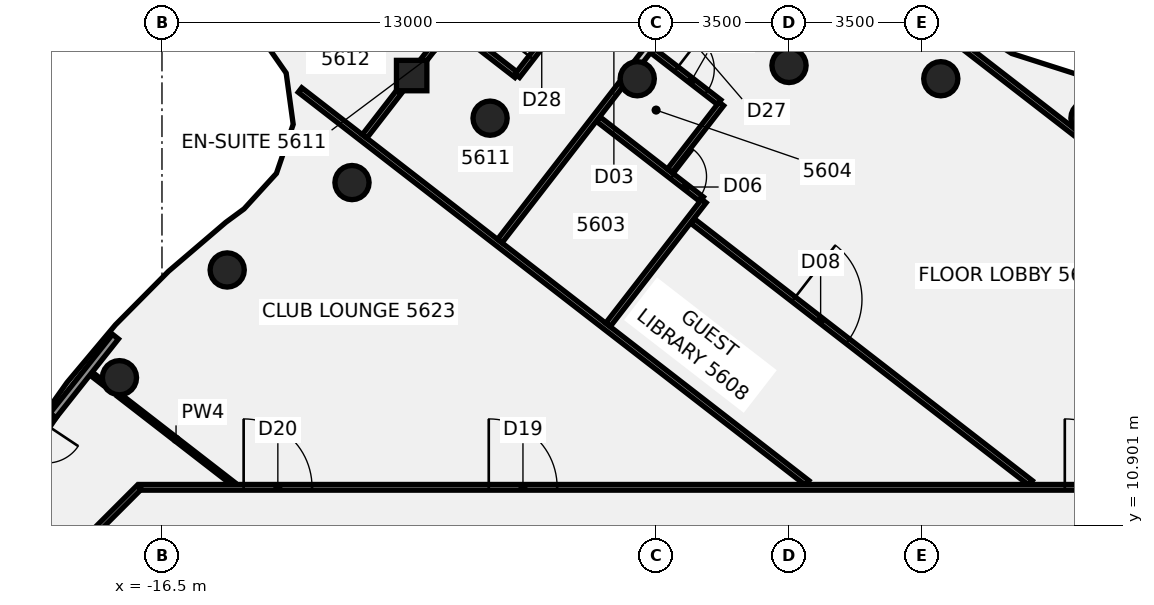
"""IFC4 building model, lengths in metres.
Left out: names, types, materials, properties, quantities, classifications, styles, units other than length and angle.
Written with IfcOpenShell. Run it as: python <this file> out.ifc"""

import sys

from ifc_helpers import new_model, si_unit, direction, frame, frame_2d, origin, origin_2d, place, context, subcontext, project, spatial, rectangle, circle, extrude, element, fill, save


model = new_model("IFC4")
c1 = context("Model", 3, precision=1e-05, world=origin(), true_north=direction((0.0, 1.0)))
c2 = subcontext(c1, "Body", "Model", "MODEL_VIEW")
j1 = project(units=[si_unit("LENGTHUNIT", "METRE"), si_unit("PLANEANGLEUNIT", "RADIAN")], contexts=[c1])
p1 = place(None, origin())
s1 = spatial("IfcSite", under=j1, at=p1, CompositionType="ELEMENT")
p2 = place(p1, origin())
s2 = spatial("IfcBuilding", under=s1, at=p2, CompositionType="ELEMENT")
p3 = place(p2, frame((0.0, 0.0, 223.5)))
s3 = spatial("IfcBuildingStorey", under=s2, at=p3, CompositionType="ELEMENT", Elevation=223.5)
for number, where, z_axis, x_axis in (
    (1, (7.866, 21.613, -0.14), (0.0, 0.0, 1.0), (1.0, 0.0, 0.0)),
    (2, (3.994, 22.651, -0.14), (0.0, 0.0, 1.0), (1.0, 0.0, 0.0)),
    (3, (0.0, 23.0, -0.14), (0.0, 0.0, 1.0), (1.0, 0.0, 0.0)),
    (4, (-3.994, 22.651, -0.14), (0.0, 0.0, 1.0), (1.0, 0.0, 0.0)),
    (5, (-7.866, 21.613, -0.14), (0.0, 0.0, 1.0), (1.0, 0.0, 0.0)),
    (6, (-11.5, 19.919, -0.14), (0.0, 0.0, 1.0), (1.0, 0.0, 0.0)),
    (7, (-14.784, 17.619, -0.14), (0.0, 0.0, 1.0), (1.0, 0.0, 0.0)),
    (8, (-17.619, 14.784, -0.14), (0.0, 0.0, 1.0), (1.0, 0.0, 0.0)),
):
    element("IfcColumn", number, at=place(p3, frame(where, z_axis=z_axis, x_axis=x_axis)), inside=s3, PredefinedType="COLUMN", context=c2, shape_type="SweptSolid", body=[
        extrude(circle(Radius=0.45, at=origin_2d()), origin(), (0.0, 0.0, 1.0), 3.6),
    ])
p4 = place(p3, frame((-9.93, 22.734, -0.139), z_axis=(-0.003253410494, -0.050292303889, 0.998729242332), x_axis=(0.612206971223, 0.789594273186, 0.041755336635)))
e9 = element("IfcColumn", 9, at=p4, inside=s3, PredefinedType="COLUMN", context=c2, shape_type="SweptSolid", body=[
    extrude(rectangle(XDim=0.8, YDim=0.8, at=origin_2d()), origin(), (0.0, 0.0, 1.0), 3.602),
])
p5 = place(p3, frame((-18.391, 14.913, 0.0), z_axis=(0.0, 0.0, 1.0), x_axis=(0.79050846248, -0.612451117026, 0.0)))
e10 = element("IfcWall", 10, at=p5, inside=s3, PredefinedType="PARTITIONING", context=c2, shape_type="SweptSolid", body=[
    extrude(rectangle(XDim=0.443, YDim=0.1, at=frame_2d((0.221, 0.0))), origin(), (0.0, 0.0, 1.0), 2.864),
])
p6 = place(p3, frame((-17.636, 14.329, 0.0), z_axis=(0.0, 0.0, 1.0), x_axis=(0.790578641308, -0.612360524452, 0.0)))
e11 = element("IfcWall", 11, at=p6, inside=s3, PredefinedType="PARTITIONING", context=c2, shape_type="SweptSolid", body=[
    extrude(rectangle(XDim=3.811, YDim=0.1, at=frame_2d((1.906, 0.0))), origin(), (0.0, 0.0, 1.0), 2.864),
])
p7 = place(p3, frame((-12.868, 22.354, 0.0), z_axis=(0.0, 0.0, 1.0), x_axis=(0.790589551305, -0.61234643901, 0.0)))
e12 = element("IfcWall", 12, at=p7, inside=s3, PredefinedType="PARTITIONING", context=c2, shape_type="SweptSolid", body=[
    extrude(rectangle(XDim=16.882, YDim=0.15, at=frame_2d((8.441, 0.0))), origin(), (0.0, 0.0, 1.0), 2.864),
])
p8 = place(p3, frame((-10.612, 25.414, 0.0), z_axis=(0.0, 0.0, 1.0), x_axis=(0.790364214812, -0.612637256412, 0.0)))
e13 = element("IfcWall", 13, at=p8, inside=s3, PredefinedType="PARTITIONING", context=c2, shape_type="SweptSolid", body=[
    extrude(rectangle(XDim=4.36, YDim=0.15, at=frame_2d((2.18, 0.0))), origin(), (0.0, 0.0, 1.0), 2.864),
])
p9 = place(p3, frame((-5.023, 21.59, 0.0), z_axis=(0.0, 0.0, 1.0), x_axis=(0.790487958192, -0.612477581592, 0.0)))
e14 = element("IfcWall", 14, at=p9, inside=s3, PredefinedType="PARTITIONING", context=c2, shape_type="SweptSolid", body=[
    extrude(rectangle(XDim=3.445, YDim=0.15, at=frame_2d((1.723, 0.0))), origin(), (0.0, 0.0, 1.0), 2.864),
])
p10 = place(p9, frame((2.47, 0.0, 0.0)))
e15 = element("IfcOpeningElement", 15, at=p10, cuts=e14, PredefinedType="OPENING", context=c2, shape_type="SweptSolid", body=[
    extrude(rectangle(XDim=0.9, YDim=2.1, at=frame_2d((0.45, 1.05))), frame((0.0, 0.085, 0.0), z_axis=(0.0, -1.0, 0.0), x_axis=(1.0, 0.0, 0.0)), (0.0, 0.0, 1.0), 0.17),
])
p11 = place(p3, frame((-3.583, 23.384, 0.0), z_axis=(0.0, 0.0, 1.0), x_axis=(0.790792860223, -0.612083860447, 0.0)))
e16 = element("IfcWall", 16, at=p11, inside=s3, PredefinedType="PARTITIONING", context=c2, shape_type="SweptSolid", body=[
    extrude(rectangle(XDim=2.205, YDim=0.15, at=frame_2d((1.103, 0.0))), origin(), (0.0, 0.0, 1.0), 2.864),
])
p12 = place(p11, frame((0.78, 0.0, 0.0)))
e17 = element("IfcOpeningElement", 17, at=p12, cuts=e16, PredefinedType="OPENING", context=c2, shape_type="SweptSolid", body=[
    extrude(rectangle(XDim=1.0, YDim=2.1, at=frame_2d((0.5, 1.05))), frame((0.0, 0.085, 0.0), z_axis=(0.0, -1.0, 0.0), x_axis=(1.0, 0.0, 0.0)), (0.0, 0.0, 1.0), 0.17),
])
p13 = place(p3, frame((-2.544, 18.911, 0.0), z_axis=(0.0, 0.0, 1.0), x_axis=(0.790555726882, -0.612390106626, 0.0)))
e18 = element("IfcWall", 18, at=p13, inside=s3, PredefinedType="PARTITIONING", context=c2, shape_type="SweptSolid", body=[
    extrude(rectangle(XDim=11.258, YDim=0.15, at=frame_2d((5.629, 0.0))), origin(), (0.0, 0.0, 1.0), 2.864),
])
p14 = place(p13, frame((3.37, 0.0, 0.0)))
e19 = element("IfcOpeningElement", 19, at=p14, cuts=e18, PredefinedType="OPENING", context=c2, shape_type="SweptSolid", body=[
    extrude(rectangle(XDim=1.8, YDim=2.1, at=frame_2d((0.9, 1.05))), frame((0.0, 0.085, 0.0), z_axis=(0.0, -1.0, 0.0), x_axis=(1.0, 0.0, 0.0)), (0.0, 0.0, 1.0), 0.17),
])
p15 = place(p3, frame((2.355, 25.236, 0.0), z_axis=(0.0, 0.0, 1.0), x_axis=(0.790554792129, -0.612391313329, 0.0)))
e20 = element("IfcWall", 20, at=p15, inside=s3, PredefinedType="PARTITIONING", context=c2, shape_type="SweptSolid", body=[
    extrude(rectangle(XDim=14.04, YDim=0.15, at=frame_2d((7.02, 0.0))), origin(), (0.0, 0.0, 1.0), 2.864),
])
p16 = place(p15, frame((7.87, 0.0, 0.0)))
e21 = element("IfcOpeningElement", 21, at=p16, cuts=e20, PredefinedType="OPENING", context=c2, shape_type="SweptSolid", body=[
    extrude(rectangle(XDim=1.8, YDim=2.1, at=frame_2d((0.9, 1.05))), frame((0.0, 0.085, 0.0), z_axis=(0.0, -1.0, 0.0), x_axis=(1.0, 0.0, 0.0)), (0.0, 0.0, 1.0), 0.17),
])
p17 = place(p3, frame((-17.065, 11.9, 0.0), z_axis=(0.0, 0.0, 1.0), x_axis=(1.0, 0.0, 0.0)))
e22 = element("IfcWall", 22, at=p17, inside=s3, PredefinedType="PARTITIONING", context=c2, shape_type="SweptSolid", body=[
    extrude(rectangle(XDim=34.165, YDim=0.15, at=frame_2d((17.083, 0.0))), origin(), (0.0, 0.0, 1.0), 2.864),
])
p18 = place(p17, frame((24.322, 0.0, 0.0)))
e23 = element("IfcOpeningElement", 23, at=p18, cuts=e22, PredefinedType="OPENING", context=c2, shape_type="SweptSolid", body=[
    extrude(rectangle(XDim=1.8, YDim=2.1, at=frame_2d((0.9, 1.05))), frame((0.0, 0.085, 0.0), z_axis=(0.0, -1.0, 0.0), x_axis=(1.0, 0.0, 0.0)), (0.0, 0.0, 1.0), 0.17),
])
p19 = place(p17, frame((9.164, 0.0, 0.0)))
e24 = element("IfcOpeningElement", 24, at=p19, cuts=e22, PredefinedType="OPENING", context=c2, shape_type="SweptSolid", body=[
    extrude(rectangle(XDim=1.8, YDim=2.1, at=frame_2d((0.9, 1.05))), frame((0.0, 0.085, 0.0), z_axis=(0.0, -1.0, 0.0), x_axis=(1.0, 0.0, 0.0)), (0.0, 0.0, 1.0), 0.17),
])
p20 = place(p17, frame((2.714, 0.0, 0.0)))
e25 = element("IfcOpeningElement", 25, at=p20, cuts=e22, PredefinedType="OPENING", context=c2, shape_type="SweptSolid", body=[
    extrude(rectangle(XDim=1.8, YDim=2.1, at=frame_2d((0.9, 1.05))), frame((0.0, 0.085, 0.0), z_axis=(0.0, -1.0, 0.0), x_axis=(1.0, 0.0, 0.0)), (0.0, 0.0, 1.0), 0.17),
])
p21 = place(p3, frame((-18.872, 10.128, 0.0), z_axis=(0.0, 0.0, 1.0), x_axis=(0.707106781187, 0.707106781187, 0.0)))
e26 = element("IfcWall", 26, at=p21, inside=s3, PredefinedType="PARTITIONING", context=c2, shape_type="SweptSolid", body=[
    extrude(rectangle(XDim=2.505, YDim=0.15, at=frame_2d((1.253, 0.0))), origin(), (0.0, 0.0, 1.0), 2.864),
])
p22 = place(p3, frame((-11.167, 21.137, 0.0), z_axis=(0.0, 0.0, 1.0), x_axis=(0.612380249915, 0.790563362112, 0.0)))
e27 = element("IfcWall", 27, at=p22, inside=s3, PredefinedType="PARTITIONING", context=c2, shape_type="SweptSolid", body=[
    extrude(rectangle(XDim=1.474, YDim=0.15, at=frame_2d((0.737, 0.0))), origin(), (0.0, 0.0, 1.0), 2.864),
])
p23 = place(p3, frame((-9.68, 23.057, 0.0), z_axis=(0.0, 0.0, 1.0), x_axis=(0.612369549525, 0.790571650652, 0.0)))
e28 = element("IfcWall", 28, at=p23, inside=s3, PredefinedType="PARTITIONING", context=c2, shape_type="SweptSolid", body=[
    extrude(rectangle(XDim=3.811, YDim=0.15, at=frame_2d((1.906, 0.0))), origin(), (0.0, 0.0, 1.0), 2.864),
])
p24 = place(p3, frame((-7.609, 18.382, 0.0), z_axis=(0.0, 0.0, 1.0), x_axis=(0.612374115558, 0.790568113823, 0.0)))
e29 = element("IfcWall", 29, at=p24, inside=s3, PredefinedType="PARTITIONING", context=c2, shape_type="SweptSolid", body=[
    extrude(rectangle(XDim=5.367, YDim=0.15, at=frame_2d((2.683, 0.0))), origin(), (0.0, 0.0, 1.0), 2.864),
])
p25 = place(p3, frame((-4.047, 22.98, 0.0), z_axis=(0.0, 0.0, 1.0), x_axis=(0.612446849715, 0.790511768587, 0.0)))
e30 = element("IfcWall", 30, at=p25, inside=s3, PredefinedType="PARTITIONING", context=c2, shape_type="SweptSolid", body=[
    extrude(rectangle(XDim=8.402, YDim=0.2, at=frame_2d((4.201, 0.0))), origin(), (0.0, 0.0, 1.0), 2.864),
])
p26 = place(p25, frame((0.903, 0.0, 0.0)))
e31 = element("IfcOpeningElement", 31, at=p26, cuts=e30, PredefinedType="OPENING", context=c2, shape_type="SweptSolid", body=[
    extrude(rectangle(XDim=1.4, YDim=2.1, at=frame_2d((0.7, 1.05))), frame((0.0, 0.11, 0.0), z_axis=(0.0, -1.0, 0.0), x_axis=(1.0, 0.0, 0.0)), (0.0, 0.0, 1.0), 0.22),
])
p27 = place(p3, frame((-7.15, 22.731, 0.0), z_axis=(0.0, 0.0, 1.0), x_axis=(0.612430986652, 0.790524058197, 0.0)))
e32 = element("IfcWall", 32, at=p27, inside=s3, PredefinedType="PARTITIONING", context=c2, shape_type="SweptSolid", body=[
    extrude(rectangle(XDim=2.521, YDim=0.15, at=frame_2d((1.26, 0.0))), origin(), (0.0, 0.0, 1.0), 2.864),
])
p28 = place(p27, frame((0.6, 0.0, 0.0)))
e33 = element("IfcOpeningElement", 33, at=p28, cuts=e32, PredefinedType="OPENING", context=c2, shape_type="SweptSolid", body=[
    extrude(rectangle(XDim=0.9, YDim=2.1, at=frame_2d((0.45, 1.05))), frame((0.0, 0.085, 0.0), z_axis=(0.0, -1.0, 0.0), x_axis=(1.0, 0.0, 0.0)), (0.0, 0.0, 1.0), 0.17),
])
p29 = place(p3, frame((-4.763, 16.177, 0.0), z_axis=(0.0, 0.0, 1.0), x_axis=(0.612470769592, 0.790493236148, 0.0)))
e34 = element("IfcWall", 34, at=p29, inside=s3, PredefinedType="PARTITIONING", context=c2, shape_type="SweptSolid", body=[
    extrude(rectangle(XDim=4.12, YDim=0.15, at=frame_2d((2.06, 0.0))), origin(), (0.0, 0.0, 1.0), 2.864),
])
p30 = place(p3, frame((-3.14, 20.232, 0.0), z_axis=(0.0, 0.0, 1.0), x_axis=(0.612310650006, 0.790617270169, 0.0)))
e35 = element("IfcWall", 35, at=p30, inside=s3, PredefinedType="PARTITIONING", context=c2, shape_type="SweptSolid", body=[
    extrude(rectangle(XDim=2.221, YDim=0.15, at=frame_2d((1.11, 0.0))), origin(), (0.0, 0.0, 1.0), 2.864),
])
p31 = place(p3, frame((-17.724, 15.865, 0.0), z_axis=(0.0, 0.0, 1.0), x_axis=(-0.620856316698, -0.783924380292, 0.0)))
e36 = element("IfcWall", 36, at=p31, inside=s3, PredefinedType="SOLIDWALL", context=c2, shape_type="SweptSolid", body=[
    extrude(rectangle(XDim=2.65, YDim=0.2, at=frame_2d((1.325, 0.0))), origin(), (0.0, 0.0, 1.0), 3.46),
])
p32 = place(p3, frame((-19.37, 13.787, 0.0), z_axis=(0.0, 0.0, 1.0), x_axis=(-0.554171485248, -0.832402525788, 0.0)))
e37 = element("IfcWall", 37, at=p32, inside=s3, PredefinedType="SOLIDWALL", context=c2, shape_type="SweptSolid", body=[
    extrude(rectangle(XDim=1.599, YDim=0.2, at=frame_2d((0.799, 0.0))), origin(), (0.0, 0.0, 1.0), 3.46),
])
p33 = place(p32, frame((0.299, 0.0, 0.0)))
e38 = element("IfcOpeningElement", 38, at=p33, cuts=e37, PredefinedType="OPENING", context=c2, shape_type="SweptSolid", body=[
    extrude(rectangle(XDim=1.0, YDim=2.4, at=frame_2d((0.5, 1.2))), frame((0.0, 0.11, 0.0), z_axis=(0.0, -1.0, 0.0), x_axis=(1.0, 0.0, 0.0)), (0.0, 0.0, 1.0), 0.22),
])
p34 = place(p10, frame((0.9, 0.0, 0.0), z_axis=(0.0, 0.0, 1.0), x_axis=(-1.0, 0.0, 0.0)))
e39 = element("IfcDoor", 39, at=p34, inside=s3, OperationType="SINGLE_SWING_RIGHT", PredefinedType="DOOR", context=c2, shape_type="SweptSolid", body=[
    extrude(rectangle(XDim=0.9, YDim=2.1, at=frame_2d((0.45, 1.05))), frame((0.0, 0.025, 0.0), z_axis=(0.0, -1.0, 0.0), x_axis=(1.0, 0.0, 0.0)), (0.0, 0.0, 1.0), 0.05),
])
fill(e15, e39)
p35 = place(p12, frame((1.0, 0.0, 0.0), z_axis=(0.0, 0.0, 1.0), x_axis=(-1.0, 0.0, 0.0)))
e40 = element("IfcDoor", 40, at=p35, inside=s3, OperationType="SINGLE_SWING_RIGHT", PredefinedType="DOOR", context=c2, shape_type="SweptSolid", body=[
    extrude(rectangle(XDim=1.0, YDim=2.1, at=frame_2d((0.5, 1.05))), frame((0.0, 0.025, 0.0), z_axis=(0.0, -1.0, 0.0), x_axis=(1.0, 0.0, 0.0)), (0.0, 0.0, 1.0), 0.05),
])
fill(e17, e40)
p36 = place(p14, frame((1.8, 0.0, 0.0), z_axis=(0.0, 0.0, 1.0), x_axis=(-1.0, 0.0, 0.0)))
e41 = element("IfcDoor", 41, at=p36, inside=s3, OperationType="DOUBLE_DOOR_SINGLE_SWING", PredefinedType="DOOR", context=c2, shape_type="SweptSolid", body=[
    extrude(rectangle(XDim=1.8, YDim=2.1, at=frame_2d((0.9, 1.05))), frame((0.0, 0.025, 0.0), z_axis=(0.0, -1.0, 0.0), x_axis=(1.0, 0.0, 0.0)), (0.0, 0.0, 1.0), 0.05),
])
fill(e19, e41)
p37 = place(p18, frame((1.8, 0.0, 0.0), z_axis=(0.0, 0.0, 1.0), x_axis=(-1.0, 0.0, 0.0)))
e42 = element("IfcDoor", 42, at=p37, inside=s3, OperationType="DOUBLE_DOOR_SINGLE_SWING", PredefinedType="DOOR", context=c2, shape_type="SweptSolid", body=[
    extrude(rectangle(XDim=1.8, YDim=2.1, at=frame_2d((0.9, 1.05))), frame((0.0, 0.025, 0.0), z_axis=(0.0, -1.0, 0.0), x_axis=(1.0, 0.0, 0.0)), (0.0, 0.0, 1.0), 0.05),
])
fill(e23, e42)
p38 = place(p19, origin())
e43 = element("IfcDoor", 43, at=p38, inside=s3, OperationType="DOUBLE_DOOR_SINGLE_SWING", PredefinedType="DOOR", context=c2, shape_type="SweptSolid", body=[
    extrude(rectangle(XDim=1.8, YDim=2.1, at=frame_2d((0.9, 1.05))), frame((0.0, 0.025, 0.0), z_axis=(0.0, -1.0, 0.0), x_axis=(1.0, 0.0, 0.0)), (0.0, 0.0, 1.0), 0.05),
])
fill(e24, e43)
p39 = place(p20, origin())
e44 = element("IfcDoor", 44, at=p39, inside=s3, OperationType="DOUBLE_DOOR_SINGLE_SWING", PredefinedType="DOOR", context=c2, shape_type="SweptSolid", body=[
    extrude(rectangle(XDim=1.8, YDim=2.1, at=frame_2d((0.9, 1.05))), frame((0.0, 0.025, 0.0), z_axis=(0.0, -1.0, 0.0), x_axis=(1.0, 0.0, 0.0)), (0.0, 0.0, 1.0), 0.05),
])
fill(e25, e44)
p40 = place(p28, origin())
e45 = element("IfcDoor", 45, at=p40, inside=s3, OperationType="SINGLE_SWING_RIGHT", PredefinedType="DOOR", context=c2, shape_type="SweptSolid", body=[
    extrude(rectangle(XDim=0.9, YDim=2.1, at=frame_2d((0.45, 1.05))), frame((0.0, 0.025, 0.0), z_axis=(0.0, -1.0, 0.0), x_axis=(1.0, 0.0, 0.0)), (0.0, 0.0, 1.0), 0.05),
])
fill(e33, e45)
save(model, sys.argv[1])
